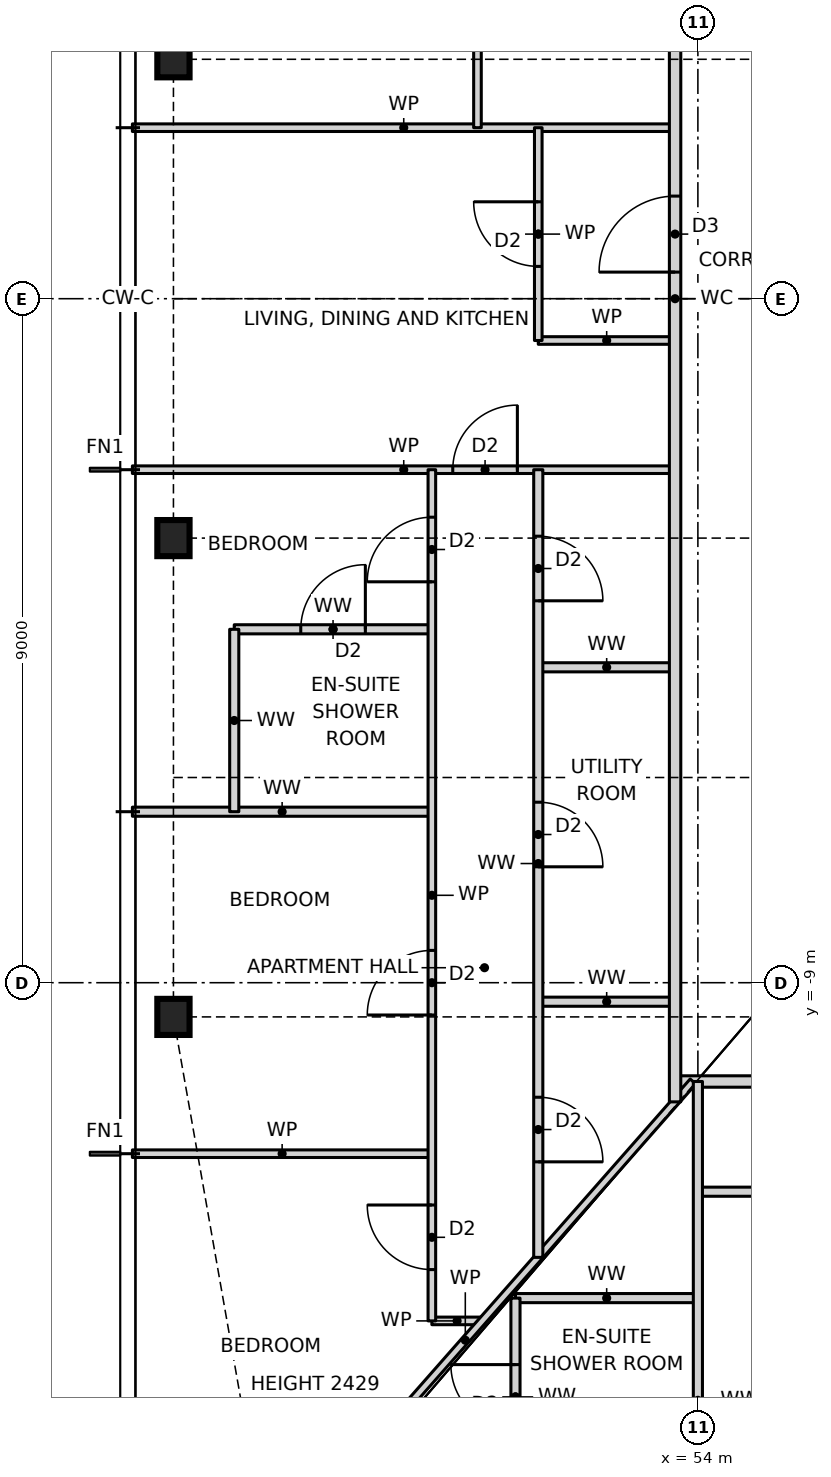
"""IFC4 building model, lengths in metres.
Left out: names, types, materials, properties, quantities, classifications, styles, units other than length and angle.
Written with IfcOpenShell. Run it as: python <this file> out.ifc"""

import sys

from ifc_helpers import new_model, si_unit, direction, frame, frame_2d, origin, origin_2d, place, context, subcontext, project, spatial, rectangle, i_section, extrude, element, fill, save


model = new_model("IFC4")
c1 = context("Model", 3, precision=1e-05, world=origin(), true_north=direction((0.0, 1.0)))
c2 = subcontext(c1, "Body", "Model", "MODEL_VIEW")
j1 = project(units=[si_unit("LENGTHUNIT", "METRE"), si_unit("PLANEANGLEUNIT", "RADIAN")], contexts=[c1])
p1 = place(None, origin())
s1 = spatial("IfcSite", under=j1, at=p1, CompositionType="ELEMENT")
p2 = place(p1, origin())
s2 = spatial("IfcBuilding", under=s1, at=p2, CompositionType="ELEMENT")
p3 = place(p2, frame((0.0, 0.0, 50.0)))
s3 = spatial("IfcBuildingStorey", under=s2, at=p3, CompositionType="ELEMENT", Elevation=50.0)
for number, where, z_axis, x_axis in (
    (1, (47.1, 3.15, 0.0), (0.0, 0.0, 1.0), (1.0, 0.0, 0.0)),
    (2, (47.1, -3.15, 0.0), (0.0, 0.0, 1.0), (1.0, 0.0, 0.0)),
    (3, (47.1, -9.45, 0.0), (0.0, 0.0, 1.0), (1.0, 0.0, 0.0)),
):
    element("IfcColumn", number, at=place(p3, frame(where, z_axis=z_axis, x_axis=x_axis)), inside=s3, PredefinedType="COLUMN", context=c2, shape_type="SweptSolid", body=[
        extrude(i_section(OverallWidth=0.424, OverallDepth=0.475, WebThickness=0.048, FlangeThickness=0.077, at=origin_2d()), origin(), (0.0, 0.0, 1.0), 3.5),
    ])
p4 = place(p3, frame((50.5, -13.45, 0.0), z_axis=(0.0, 0.0, 1.0), x_axis=(1.0, 0.0, 0.0)))
e4 = element("IfcWall", 4, at=p4, inside=s3, PredefinedType="PARTITIONING", context=c2, shape_type="SweptSolid", body=[
    extrude(rectangle(XDim=0.664, YDim=0.1, at=frame_2d((0.332, 0.0))), origin(), (0.0, 0.0, 1.0), 3.27),
])
p5 = place(p3, frame((51.6, -13.15, 0.0), z_axis=(0.0, 0.0, 1.0), x_axis=(1.0, 0.0, 0.0)))
e5 = element("IfcWall", 5, at=p5, inside=s3, PredefinedType="PARTITIONING", context=c2, shape_type="SweptSolid", body=[
    extrude(rectangle(XDim=2.4, YDim=0.12, at=frame_2d((1.2, 0.0))), origin(), (0.0, 0.0, 1.0), 3.27),
])
p6 = place(p3, frame((54.0, -11.75, 0.0), z_axis=(0.0, 0.0, 1.0), x_axis=(1.0, 0.0, 0.0)))
e6 = element("IfcWall", 6, at=p6, inside=s3, PredefinedType="PARTITIONING", context=c2, shape_type="SweptSolid", body=[
    extrude(rectangle(XDim=19.34, YDim=0.12, at=frame_2d((9.67, 0.0))), origin(), (0.0, 0.0, 1.0), 3.27),
])
p7 = place(p6, frame((1.375, 0.0, 0.0)))
e7 = element("IfcOpeningElement", 7, at=p7, cuts=e6, PredefinedType="OPENING", context=c2, shape_type="SweptSolid", body=[
    extrude(rectangle(XDim=0.85, YDim=2.1, at=frame_2d((0.425, 1.05))), frame((0.0, 0.07, 0.0), z_axis=(0.0, -1.0, 0.0), x_axis=(1.0, 0.0, 0.0)), (0.0, 0.0, 1.0), 0.14),
])
p8 = place(p6, frame((4.575, 0.0, 0.0)))
e8 = element("IfcOpeningElement", 8, at=p8, cuts=e6, PredefinedType="OPENING", context=c2, shape_type="SweptSolid", body=[
    extrude(rectangle(XDim=0.85, YDim=2.1, at=frame_2d((0.425, 1.05))), frame((0.0, 0.07, 0.0), z_axis=(0.0, -1.0, 0.0), x_axis=(1.0, 0.0, 0.0)), (0.0, 0.0, 1.0), 0.14),
])
p9 = place(p6, frame((11.325, 0.0, 0.0)))
e9 = element("IfcOpeningElement", 9, at=p9, cuts=e6, PredefinedType="OPENING", context=c2, shape_type="SweptSolid", body=[
    extrude(rectangle(XDim=0.85, YDim=2.1, at=frame_2d((0.425, 1.05))), frame((0.0, 0.07, 0.0), z_axis=(0.0, -1.0, 0.0), x_axis=(1.0, 0.0, 0.0)), (0.0, 0.0, 1.0), 0.14),
])
p10 = place(p6, frame((16.495, 0.0, 0.0)))
e10 = element("IfcOpeningElement", 10, at=p10, cuts=e6, PredefinedType="OPENING", context=c2, shape_type="SweptSolid", body=[
    extrude(rectangle(XDim=0.85, YDim=2.1, at=frame_2d((0.425, 1.05))), frame((0.0, 0.07, 0.0), z_axis=(0.0, -1.0, 0.0), x_axis=(1.0, 0.0, 0.0)), (0.0, 0.0, 1.0), 0.14),
])
p11 = place(p3, frame((46.56, -11.25, 0.0), z_axis=(0.0, 0.0, 1.0), x_axis=(1.0, 0.0, 0.0)))
e11 = element("IfcWall", 11, at=p11, inside=s3, PredefinedType="PARTITIONING", context=c2, shape_type="SweptSolid", body=[
    extrude(rectangle(XDim=3.94, YDim=0.1, at=frame_2d((1.97, 0.0))), origin(), (0.0, 0.0, 1.0), 3.27),
])
p12 = place(p3, frame((53.7, -10.3, 0.0), z_axis=(0.0, 0.0, 1.0), x_axis=(1.0, 0.0, 0.0)))
e12 = element("IfcWall", 12, at=p12, inside=s3, PredefinedType="PARTITIONING", context=c2, shape_type="SweptSolid", body=[
    extrude(rectangle(XDim=18.6, YDim=0.15, at=frame_2d((9.3, 0.0))), origin(), (0.0, 0.0, 1.0), 3.27),
])
p13 = place(p12, frame((4.8, 0.0, 0.0)))
e13 = element("IfcOpeningElement", 13, at=p13, cuts=e12, PredefinedType="OPENING", context=c2, shape_type="SweptSolid", body=[
    extrude(rectangle(XDim=1.0, YDim=2.1, at=frame_2d((0.5, 1.05))), frame((0.0, 0.085, 0.0), z_axis=(0.0, -1.0, 0.0), x_axis=(1.0, 0.0, 0.0)), (0.0, 0.0, 1.0), 0.17),
])
p14 = place(p3, frame((51.9, -9.25, 0.0), z_axis=(0.0, 0.0, 1.0), x_axis=(1.0, 0.0, 0.0)))
e14 = element("IfcWall", 14, at=p14, inside=s3, PredefinedType="PARTITIONING", context=c2, shape_type="SweptSolid", body=[
    extrude(rectangle(XDim=1.8, YDim=0.12, at=frame_2d((0.9, 0.0))), origin(), (0.0, 0.0, 1.0), 3.27),
])
p15 = place(p3, frame((46.56, -6.75, 0.0), z_axis=(0.0, 0.0, 1.0), x_axis=(1.0, 0.0, 0.0)))
e15 = element("IfcWall", 15, at=p15, inside=s3, PredefinedType="PARTITIONING", context=c2, shape_type="SweptSolid", body=[
    extrude(rectangle(XDim=3.94, YDim=0.12, at=frame_2d((1.97, 0.0))), origin(), (0.0, 0.0, 1.0), 3.27),
])
p16 = place(p3, frame((51.9, -4.85, 0.0), z_axis=(0.0, 0.0, 1.0), x_axis=(1.0, 0.0, 0.0)))
e16 = element("IfcWall", 16, at=p16, inside=s3, PredefinedType="PARTITIONING", context=c2, shape_type="SweptSolid", body=[
    extrude(rectangle(XDim=1.8, YDim=0.12, at=frame_2d((0.9, 0.0))), origin(), (0.0, 0.0, 1.0), 3.27),
])
p17 = place(p3, frame((47.9, -4.35, 0.0), z_axis=(0.0, 0.0, 1.0), x_axis=(1.0, 0.0, 0.0)))
e17 = element("IfcWall", 17, at=p17, inside=s3, PredefinedType="PARTITIONING", context=c2, shape_type="SweptSolid", body=[
    extrude(rectangle(XDim=2.6, YDim=0.12, at=frame_2d((1.3, 0.0))), origin(), (0.0, 0.0, 1.0), 3.27),
])
p18 = place(p17, frame((0.875, 0.0, 0.0)))
e18 = element("IfcOpeningElement", 18, at=p18, cuts=e17, PredefinedType="OPENING", context=c2, shape_type="SweptSolid", body=[
    extrude(rectangle(XDim=0.85, YDim=2.1, at=frame_2d((0.425, 1.05))), frame((0.0, 0.07, 0.0), z_axis=(0.0, -1.0, 0.0), x_axis=(1.0, 0.0, 0.0)), (0.0, 0.0, 1.0), 0.14),
])
p19 = place(p3, frame((46.56, -2.25, 0.0), z_axis=(0.0, 0.0, 1.0), x_axis=(1.0, 0.0, 0.0)))
e19 = element("IfcWall", 19, at=p19, inside=s3, PredefinedType="PARTITIONING", context=c2, shape_type="SweptSolid", body=[
    extrude(rectangle(XDim=7.14, YDim=0.1, at=frame_2d((3.57, 0.0))), origin(), (0.0, 0.0, 1.0), 3.27),
])
p20 = place(p19, frame((4.215, 0.0, 0.0)))
e20 = element("IfcOpeningElement", 20, at=p20, cuts=e19, PredefinedType="OPENING", context=c2, shape_type="SweptSolid", body=[
    extrude(rectangle(XDim=0.85, YDim=2.1, at=frame_2d((0.425, 1.05))), frame((0.0, 0.06, 0.0), z_axis=(0.0, -1.0, 0.0), x_axis=(1.0, 0.0, 0.0)), (0.0, 0.0, 1.0), 0.12),
])
p21 = place(p3, frame((51.9, -0.55, 0.0), z_axis=(0.0, 0.0, 1.0), x_axis=(1.0, 0.0, 0.0)))
e21 = element("IfcWall", 21, at=p21, inside=s3, PredefinedType="PARTITIONING", context=c2, shape_type="SweptSolid", body=[
    extrude(rectangle(XDim=1.8, YDim=0.1, at=frame_2d((0.9, 0.0))), origin(), (0.0, 0.0, 1.0), 3.27),
])
p22 = place(p3, frame((46.56, 2.25, 0.0), z_axis=(0.0, 0.0, 1.0), x_axis=(1.0, 0.0, 0.0)))
e22 = element("IfcWall", 22, at=p22, inside=s3, PredefinedType="PARTITIONING", context=c2, shape_type="SweptSolid", body=[
    extrude(rectangle(XDim=7.14, YDim=0.1, at=frame_2d((3.57, 0.0))), origin(), (0.0, 0.0, 1.0), 3.27),
])
p23 = place(p3, frame((47.944, -17.109, 0.0), z_axis=(0.0, 0.0, 1.0), x_axis=(0.660638210404, 0.750704439146, 0.0)))
e23 = element("IfcWall", 23, at=p23, inside=s3, PredefinedType="PARTITIONING", context=c2, shape_type="SweptSolid", body=[
    extrude(rectangle(XDim=9.07, YDim=0.1, at=frame_2d((4.535, 0.0))), origin(), (0.0, 0.0, 1.0), 2.429),
])
p24 = place(p3, frame((54.0, -18.69, 0.0), z_axis=(0.0, 0.0, 1.0), x_axis=(0.0, 1.0, 0.0)))
e24 = element("IfcWall", 24, at=p24, inside=s3, PredefinedType="PARTITIONING", context=c2, shape_type="SweptSolid", body=[
    extrude(rectangle(XDim=8.39, YDim=0.12, at=frame_2d((4.195, 0.0))), origin(), (0.0, 0.0, 1.0), 3.27),
])
p25 = place(p24, frame((1.045, 0.0, 0.0)))
e25 = element("IfcOpeningElement", 25, at=p25, cuts=e24, PredefinedType="OPENING", context=c2, shape_type="SweptSolid", body=[
    extrude(rectangle(XDim=0.85, YDim=2.1, at=frame_2d((0.425, 1.05))), frame((0.0, 0.07, 0.0), z_axis=(0.0, -1.0, 0.0), x_axis=(1.0, 0.0, 0.0)), (0.0, 0.0, 1.0), 0.14),
])
p26 = place(p3, frame((53.7, -10.568, 0.0), z_axis=(0.0, 0.0, 1.0), x_axis=(0.0, 1.0, 0.0)))
e26 = element("IfcWall", 26, at=p26, inside=s3, PredefinedType="PARTITIONING", context=c2, shape_type="SweptSolid", body=[
    extrude(rectangle(XDim=21.136, YDim=0.15, at=frame_2d((10.568, 0.0))), origin(), (0.0, 0.0, 1.0), 3.27),
])
p27 = place(p26, frame((16.318, 0.0, 0.0)))
e27 = element("IfcOpeningElement", 27, at=p27, cuts=e26, PredefinedType="OPENING", context=c2, shape_type="SweptSolid", body=[
    extrude(rectangle(XDim=1.0, YDim=2.1, at=frame_2d((0.5, 1.05))), frame((0.0, 0.085, 0.0), z_axis=(0.0, -1.0, 0.0), x_axis=(1.0, 0.0, 0.0)), (0.0, 0.0, 1.0), 0.17),
])
p28 = place(p26, frame((10.918, 0.0, 0.0)))
e28 = element("IfcOpeningElement", 28, at=p28, cuts=e26, PredefinedType="OPENING", context=c2, shape_type="SweptSolid", body=[
    extrude(rectangle(XDim=1.0, YDim=2.1, at=frame_2d((0.5, 1.05))), frame((0.0, 0.085, 0.0), z_axis=(0.0, -1.0, 0.0), x_axis=(1.0, 0.0, 0.0)), (0.0, 0.0, 1.0), 0.17),
])
p29 = place(p3, frame((51.9, -12.614, 0.0), z_axis=(0.0, 0.0, 1.0), x_axis=(0.0, 1.0, 0.0)))
e29 = element("IfcWall", 29, at=p29, inside=s3, PredefinedType="PARTITIONING", context=c2, shape_type="SweptSolid", body=[
    extrude(rectangle(XDim=10.364, YDim=0.12, at=frame_2d((5.182, 0.0))), origin(), (0.0, 0.0, 1.0), 3.27),
])
p30 = place(p29, frame((8.639, 0.0, 0.0)))
e30 = element("IfcOpeningElement", 30, at=p30, cuts=e29, PredefinedType="OPENING", context=c2, shape_type="SweptSolid", body=[
    extrude(rectangle(XDim=0.85, YDim=2.1, at=frame_2d((0.425, 1.05))), frame((0.0, 0.07, 0.0), z_axis=(0.0, -1.0, 0.0), x_axis=(1.0, 0.0, 0.0)), (0.0, 0.0, 1.0), 0.14),
])
p31 = place(p29, frame((5.139, 0.0, 0.0)))
e31 = element("IfcOpeningElement", 31, at=p31, cuts=e29, PredefinedType="OPENING", context=c2, shape_type="SweptSolid", body=[
    extrude(rectangle(XDim=0.85, YDim=2.1, at=frame_2d((0.425, 1.05))), frame((0.0, 0.07, 0.0), z_axis=(0.0, -1.0, 0.0), x_axis=(1.0, 0.0, 0.0)), (0.0, 0.0, 1.0), 0.14),
])
p32 = place(p29, frame((1.257, 0.0, 0.0)))
e32 = element("IfcOpeningElement", 32, at=p32, cuts=e29, PredefinedType="OPENING", context=c2, shape_type="SweptSolid", body=[
    extrude(rectangle(XDim=0.85, YDim=2.1, at=frame_2d((0.425, 1.05))), frame((0.0, 0.07, 0.0), z_axis=(0.0, -1.0, 0.0), x_axis=(1.0, 0.0, 0.0)), (0.0, 0.0, 1.0), 0.14),
])
p33 = place(p3, frame((51.9, -0.55, 0.0), z_axis=(0.0, 0.0, 1.0), x_axis=(0.0, 1.0, 0.0)))
e33 = element("IfcWall", 33, at=p33, inside=s3, PredefinedType="PARTITIONING", context=c2, shape_type="SweptSolid", body=[
    extrude(rectangle(XDim=2.8, YDim=0.1, at=frame_2d((1.4, 0.0))), origin(), (0.0, 0.0, 1.0), 3.27),
])
p34 = place(p33, frame((0.975, 0.0, 0.0)))
e34 = element("IfcOpeningElement", 34, at=p34, cuts=e33, PredefinedType="OPENING", context=c2, shape_type="SweptSolid", body=[
    extrude(rectangle(XDim=0.85, YDim=2.1, at=frame_2d((0.425, 1.05))), frame((0.0, 0.06, 0.0), z_axis=(0.0, -1.0, 0.0), x_axis=(1.0, 0.0, 0.0)), (0.0, 0.0, 1.0), 0.12),
])
p35 = place(p3, frame((51.6, -15.75, 0.0), z_axis=(0.0, 0.0, 1.0), x_axis=(0.0, 1.0, 0.0)))
e35 = element("IfcWall", 35, at=p35, inside=s3, PredefinedType="PARTITIONING", context=c2, shape_type="SweptSolid", body=[
    extrude(rectangle(XDim=2.6, YDim=0.12, at=frame_2d((1.3, 0.0))), origin(), (0.0, 0.0, 1.0), 3.27),
])
p36 = place(p35, frame((0.875, 0.0, 0.0)))
e36 = element("IfcOpeningElement", 36, at=p36, cuts=e35, PredefinedType="OPENING", context=c2, shape_type="SweptSolid", body=[
    extrude(rectangle(XDim=0.85, YDim=2.1, at=frame_2d((0.425, 1.05))), frame((0.0, 0.07, 0.0), z_axis=(0.0, -1.0, 0.0), x_axis=(1.0, 0.0, 0.0)), (0.0, 0.0, 1.0), 0.14),
])
p37 = place(p3, frame((51.1, 2.25, 0.0), z_axis=(0.0, 0.0, 1.0), x_axis=(0.0, 1.0, 0.0)))
e37 = element("IfcWall", 37, at=p37, inside=s3, PredefinedType="PARTITIONING", context=c2, shape_type="SweptSolid", body=[
    extrude(rectangle(XDim=9.0, YDim=0.1, at=frame_2d((4.5, 0.0))), origin(), (0.0, 0.0, 1.0), 3.27),
])
p38 = place(p37, frame((6.775, 0.0, 0.0)))
e38 = element("IfcOpeningElement", 38, at=p38, cuts=e37, PredefinedType="OPENING", context=c2, shape_type="SweptSolid", body=[
    extrude(rectangle(XDim=0.85, YDim=2.1, at=frame_2d((0.425, 1.05))), frame((0.0, 0.06, 0.0), z_axis=(0.0, -1.0, 0.0), x_axis=(1.0, 0.0, 0.0)), (0.0, 0.0, 1.0), 0.12),
])
p39 = place(p37, frame((3.575, 0.0, 0.0)))
e39 = element("IfcOpeningElement", 39, at=p39, cuts=e37, PredefinedType="OPENING", context=c2, shape_type="SweptSolid", body=[
    extrude(rectangle(XDim=0.85, YDim=2.1, at=frame_2d((0.425, 1.05))), frame((0.0, 0.06, 0.0), z_axis=(0.0, -1.0, 0.0), x_axis=(1.0, 0.0, 0.0)), (0.0, 0.0, 1.0), 0.12),
])
p40 = place(p3, frame((50.5, -13.45, 0.0), z_axis=(0.0, 0.0, 1.0), x_axis=(0.0, 1.0, 0.0)))
e40 = element("IfcWall", 40, at=p40, inside=s3, PredefinedType="PARTITIONING", context=c2, shape_type="SweptSolid", body=[
    extrude(rectangle(XDim=11.2, YDim=0.1, at=frame_2d((5.6, 0.0))), origin(), (0.0, 0.0, 1.0), 3.27),
])
p41 = place(p40, frame((9.725, 0.0, 0.0)))
e41 = element("IfcOpeningElement", 41, at=p41, cuts=e40, PredefinedType="OPENING", context=c2, shape_type="SweptSolid", body=[
    extrude(rectangle(XDim=0.85, YDim=2.1, at=frame_2d((0.425, 1.05))), frame((0.0, 0.06, 0.0), z_axis=(0.0, -1.0, 0.0), x_axis=(1.0, 0.0, 0.0)), (0.0, 0.0, 1.0), 0.12),
])
p42 = place(p40, frame((4.025, 0.0, 0.0)))
e42 = element("IfcOpeningElement", 42, at=p42, cuts=e40, PredefinedType="OPENING", context=c2, shape_type="SweptSolid", body=[
    extrude(rectangle(XDim=0.85, YDim=2.1, at=frame_2d((0.425, 1.05))), frame((0.0, 0.06, 0.0), z_axis=(0.0, -1.0, 0.0), x_axis=(1.0, 0.0, 0.0)), (0.0, 0.0, 1.0), 0.12),
])
p43 = place(p40, frame((0.675, 0.0, 0.0)))
e43 = element("IfcOpeningElement", 43, at=p43, cuts=e40, PredefinedType="OPENING", context=c2, shape_type="SweptSolid", body=[
    extrude(rectangle(XDim=0.85, YDim=2.1, at=frame_2d((0.425, 1.05))), frame((0.0, 0.06, 0.0), z_axis=(0.0, -1.0, 0.0), x_axis=(1.0, 0.0, 0.0)), (0.0, 0.0, 1.0), 0.12),
])
p44 = place(p3, frame((47.9, -6.75, 0.0), z_axis=(0.0, 0.0, 1.0), x_axis=(0.0, 1.0, 0.0)))
e44 = element("IfcWall", 44, at=p44, inside=s3, PredefinedType="PARTITIONING", context=c2, shape_type="SweptSolid", body=[
    extrude(rectangle(XDim=2.4, YDim=0.12, at=frame_2d((1.2, 0.0))), origin(), (0.0, 0.0, 1.0), 3.27),
])
p45 = place(p36, origin())
e45 = element("IfcDoor", 45, at=p45, inside=s3, OperationType="SINGLE_SWING_RIGHT", PredefinedType="DOOR", context=c2, shape_type="SweptSolid", body=[
    extrude(rectangle(XDim=0.85, YDim=2.1, at=frame_2d((0.425, 1.05))), frame((0.0, 0.025, 0.0), z_axis=(0.0, -1.0, 0.0), x_axis=(1.0, 0.0, 0.0)), (0.0, 0.0, 1.0), 0.05),
])
fill(e36, e45)
p46 = place(p28, origin())
e46 = element("IfcDoor", 46, at=p46, inside=s3, OperationType="SINGLE_SWING_LEFT", PredefinedType="DOOR", context=c2, shape_type="SweptSolid", body=[
    extrude(rectangle(XDim=1.0, YDim=2.1, at=frame_2d((0.5, 1.05))), frame((0.0, 0.025, 0.0), z_axis=(0.0, -1.0, 0.0), x_axis=(1.0, 0.0, 0.0)), (0.0, 0.0, 1.0), 0.05),
])
fill(e28, e46)
p47 = place(p34, origin())
e47 = element("IfcDoor", 47, at=p47, inside=s3, OperationType="SINGLE_SWING_RIGHT", PredefinedType="DOOR", context=c2, shape_type="SweptSolid", body=[
    extrude(rectangle(XDim=0.85, YDim=2.1, at=frame_2d((0.425, 1.05))), frame((0.0, 0.025, 0.0), z_axis=(0.0, -1.0, 0.0), x_axis=(1.0, 0.0, 0.0)), (0.0, 0.0, 1.0), 0.05),
])
fill(e34, e47)
p48 = place(p20, origin())
e48 = element("IfcDoor", 48, at=p48, inside=s3, OperationType="SINGLE_SWING_RIGHT", PredefinedType="DOOR", context=c2, shape_type="SweptSolid", body=[
    extrude(rectangle(XDim=0.85, YDim=2.1, at=frame_2d((0.425, 1.05))), frame((0.0, 0.025, 0.0), z_axis=(0.0, -1.0, 0.0), x_axis=(1.0, 0.0, 0.0)), (0.0, 0.0, 1.0), 0.05),
])
fill(e20, e48)
p49 = place(p18, origin())
e49 = element("IfcDoor", 49, at=p49, inside=s3, OperationType="SINGLE_SWING_RIGHT", PredefinedType="DOOR", context=c2, shape_type="SweptSolid", body=[
    extrude(rectangle(XDim=0.85, YDim=2.1, at=frame_2d((0.425, 1.05))), frame((0.0, 0.025, 0.0), z_axis=(0.0, -1.0, 0.0), x_axis=(1.0, 0.0, 0.0)), (0.0, 0.0, 1.0), 0.05),
])
fill(e18, e49)
p50 = place(p41, origin())
e50 = element("IfcDoor", 50, at=p50, inside=s3, OperationType="SINGLE_SWING_LEFT", PredefinedType="DOOR", context=c2, shape_type="SweptSolid", body=[
    extrude(rectangle(XDim=0.85, YDim=2.1, at=frame_2d((0.425, 1.05))), frame((0.0, 0.025, 0.0), z_axis=(0.0, -1.0, 0.0), x_axis=(1.0, 0.0, 0.0)), (0.0, 0.0, 1.0), 0.05),
])
fill(e41, e50)
p51 = place(p42, origin())
e51 = element("IfcDoor", 51, at=p51, inside=s3, OperationType="SINGLE_SWING_LEFT", PredefinedType="DOOR", context=c2, shape_type="SweptSolid", body=[
    extrude(rectangle(XDim=0.85, YDim=2.1, at=frame_2d((0.425, 1.05))), frame((0.0, 0.025, 0.0), z_axis=(0.0, -1.0, 0.0), x_axis=(1.0, 0.0, 0.0)), (0.0, 0.0, 1.0), 0.05),
])
fill(e42, e51)
p52 = place(p43, origin())
e52 = element("IfcDoor", 52, at=p52, inside=s3, OperationType="SINGLE_SWING_RIGHT", PredefinedType="DOOR", context=c2, shape_type="SweptSolid", body=[
    extrude(rectangle(XDim=0.85, YDim=2.1, at=frame_2d((0.425, 1.05))), frame((0.0, 0.025, 0.0), z_axis=(0.0, -1.0, 0.0), x_axis=(1.0, 0.0, 0.0)), (0.0, 0.0, 1.0), 0.05),
])
fill(e43, e52)
p53 = place(p30, frame((0.85, 0.0, 0.0), z_axis=(0.0, 0.0, 1.0), x_axis=(-1.0, 0.0, 0.0)))
e53 = element("IfcDoor", 53, at=p53, inside=s3, OperationType="SINGLE_SWING_RIGHT", PredefinedType="DOOR", context=c2, shape_type="SweptSolid", body=[
    extrude(rectangle(XDim=0.85, YDim=2.1, at=frame_2d((0.425, 1.05))), frame((0.0, 0.025, 0.0), z_axis=(0.0, -1.0, 0.0), x_axis=(1.0, 0.0, 0.0)), (0.0, 0.0, 1.0), 0.05),
])
fill(e30, e53)
p54 = place(p31, frame((0.85, 0.0, 0.0), z_axis=(0.0, 0.0, 1.0), x_axis=(-1.0, 0.0, 0.0)))
e54 = element("IfcDoor", 54, at=p54, inside=s3, OperationType="SINGLE_SWING_RIGHT", PredefinedType="DOOR", context=c2, shape_type="SweptSolid", body=[
    extrude(rectangle(XDim=0.85, YDim=2.1, at=frame_2d((0.425, 1.05))), frame((0.0, 0.025, 0.0), z_axis=(0.0, -1.0, 0.0), x_axis=(1.0, 0.0, 0.0)), (0.0, 0.0, 1.0), 0.05),
])
fill(e31, e54)
p55 = place(p32, frame((0.85, 0.0, 0.0), z_axis=(0.0, 0.0, 1.0), x_axis=(-1.0, 0.0, 0.0)))
e55 = element("IfcDoor", 55, at=p55, inside=s3, OperationType="SINGLE_SWING_RIGHT", PredefinedType="DOOR", context=c2, shape_type="SweptSolid", body=[
    extrude(rectangle(XDim=0.85, YDim=2.1, at=frame_2d((0.425, 1.05))), frame((0.0, 0.025, 0.0), z_axis=(0.0, -1.0, 0.0), x_axis=(1.0, 0.0, 0.0)), (0.0, 0.0, 1.0), 0.05),
])
fill(e32, e55)
save(model, sys.argv[1])
